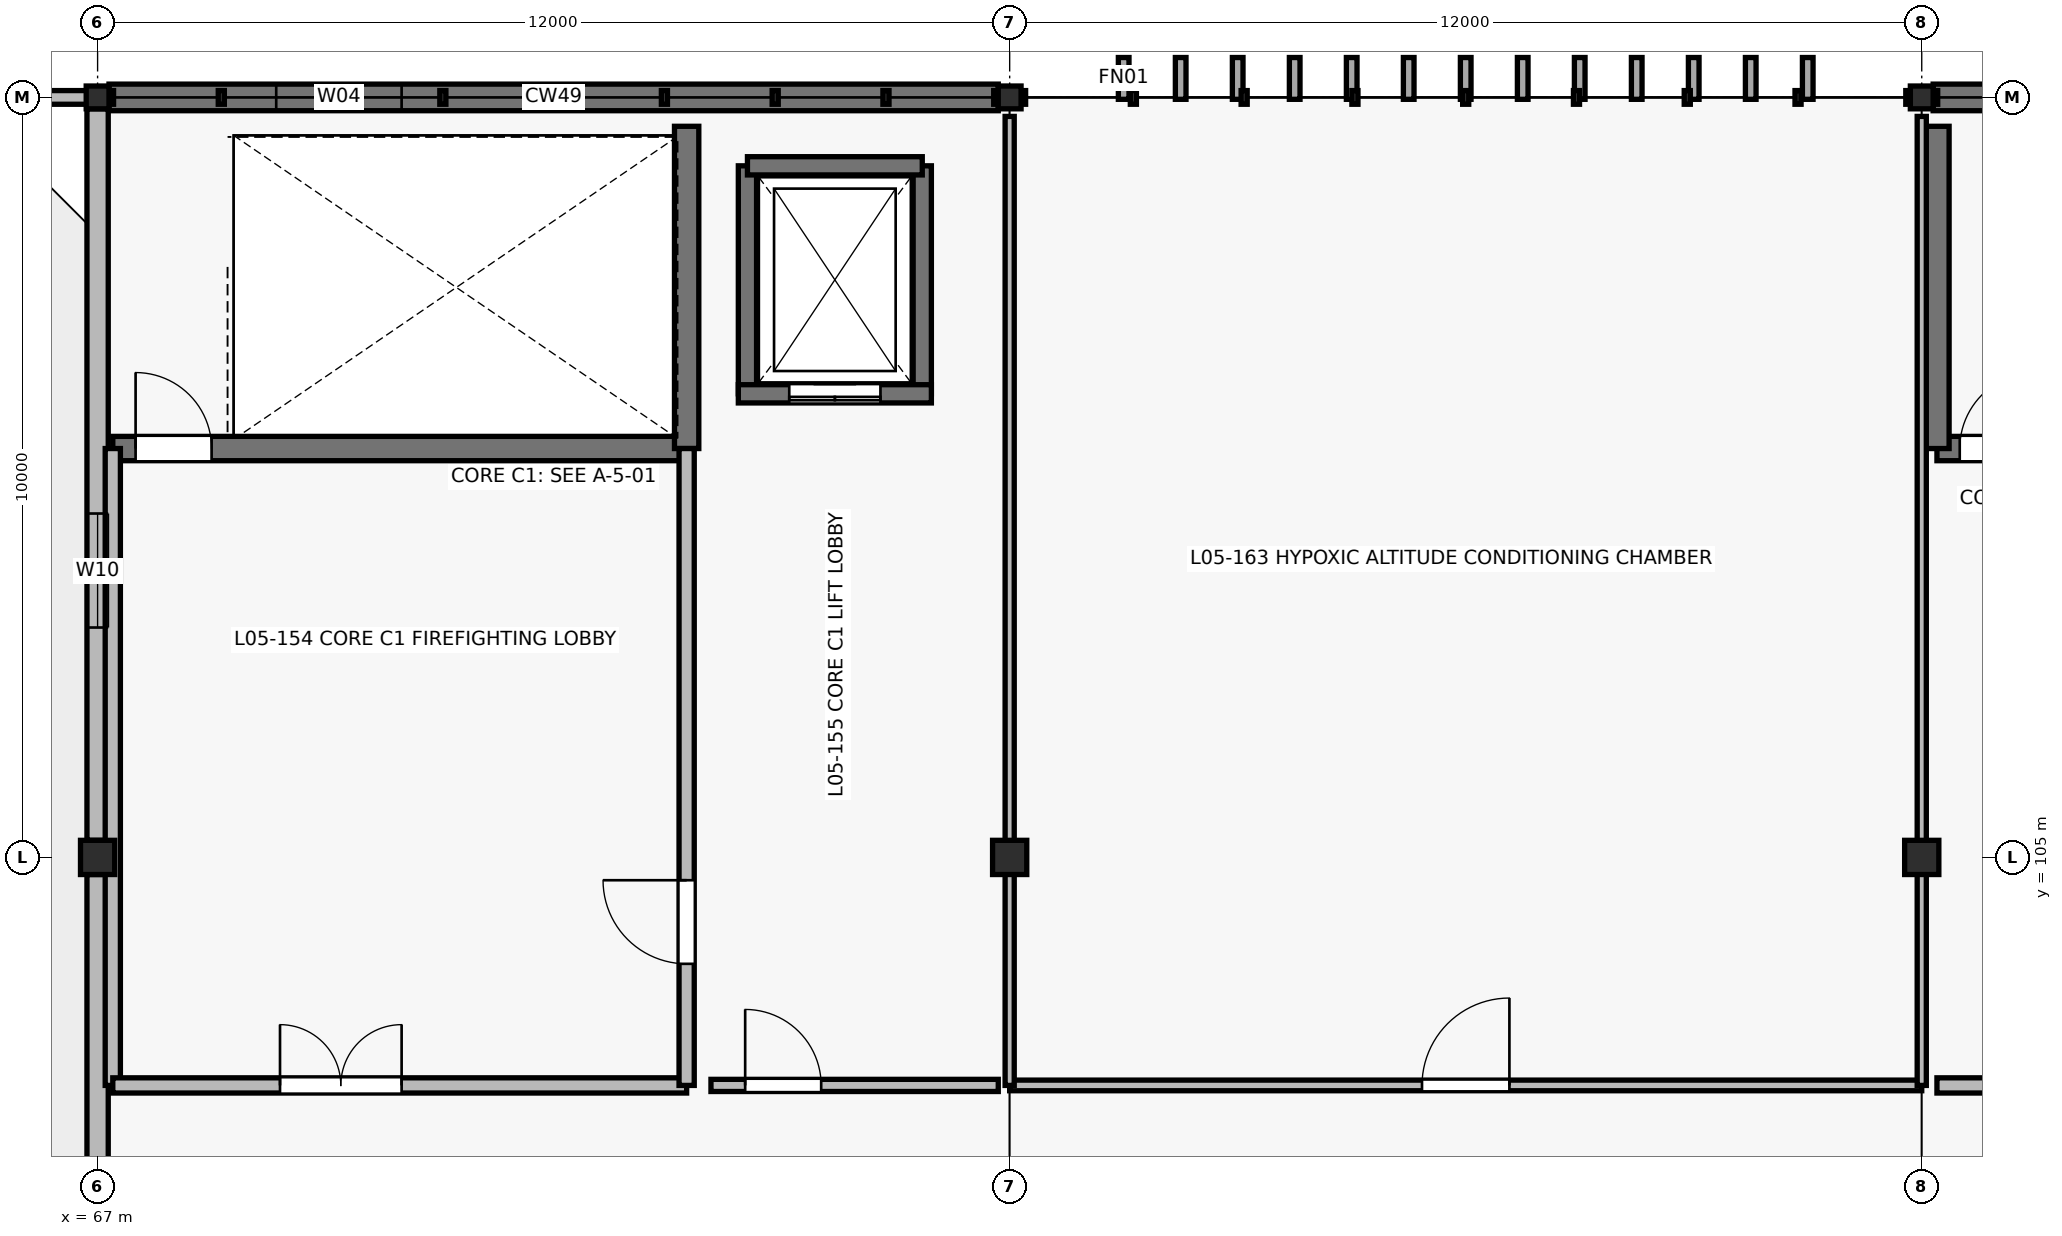
"""IFC4 building model, lengths in metres.
Left out: names, types, materials, properties, quantities, classifications, styles, units other than length and angle.
Written with IfcOpenShell. Run it as: python <this file> out.ifc"""

import sys

from ifc_helpers import new_model, si_unit, direction, frame, frame_2d, origin, origin_2d, place, context, subcontext, project, spatial, rectangle, i_section, extrude, element, fill, save


model = new_model("IFC4")
c1 = context("Model", 3, precision=1e-05, world=origin(), true_north=direction((0.0, 1.0)))
c2 = subcontext(c1, "Body", "Model", "MODEL_VIEW")
j1 = project(units=[si_unit("LENGTHUNIT", "METRE"), si_unit("PLANEANGLEUNIT", "RADIAN")], contexts=[c1])
p1 = place(None, origin())
s1 = spatial("IfcSite", under=j1, at=p1, CompositionType="ELEMENT")
p2 = place(p1, origin())
s2 = spatial("IfcBuilding", under=s1, at=p2, CompositionType="ELEMENT")
p3 = place(p2, frame((0.0, 0.0, 21.6)))
s3 = spatial("IfcBuildingStorey", under=s2, at=p3, CompositionType="ELEMENT", Elevation=21.6)
p4 = place(p3, frame((67.0, 105.0, 0.0), z_axis=(0.0, 0.0, 1.0), x_axis=(1.0, 0.0, 0.0)))
e1 = element("IfcColumn", 1, at=p4, inside=s3, PredefinedType="COLUMN", context=c2, shape_type="SweptSolid", body=[
    extrude(rectangle(XDim=0.45, YDim=0.45, at=origin_2d()), origin(), (0.0, 0.0, 1.0), 4.2),
])
p5 = place(p3, frame((67.0, 115.0, 0.0), z_axis=(0.0, 0.0, 1.0), x_axis=(1.0, 0.0, 0.0)))
e2 = element("IfcColumn", 2, at=p5, inside=s3, PredefinedType="COLUMN", context=c2, shape_type="SweptSolid", body=[
    extrude(i_section(OverallWidth=0.3, OverallDepth=0.3, WebThickness=0.011, FlangeThickness=0.019, at=origin_2d()), origin(), (0.0, 0.0, 1.0), 4.2),
])
p6 = place(p3, frame((79.0, 105.0, 0.0), z_axis=(0.0, 0.0, 1.0), x_axis=(1.0, 0.0, 0.0)))
e3 = element("IfcColumn", 3, at=p6, inside=s3, PredefinedType="COLUMN", context=c2, shape_type="SweptSolid", body=[
    extrude(rectangle(XDim=0.45, YDim=0.45, at=origin_2d()), origin(), (0.0, 0.0, 1.0), 4.2),
])
p7 = place(p3, frame((79.0, 115.0, 0.0), z_axis=(0.0, 0.0, 1.0), x_axis=(1.0, 0.0, 0.0)))
e4 = element("IfcColumn", 4, at=p7, inside=s3, PredefinedType="COLUMN", context=c2, shape_type="SweptSolid", body=[
    extrude(i_section(OverallWidth=0.3, OverallDepth=0.3, WebThickness=0.011, FlangeThickness=0.019, at=origin_2d()), origin(), (0.0, 0.0, 1.0), 4.2),
])
p8 = place(p3, frame((91.0, 105.0, 0.0), z_axis=(0.0, 0.0, 1.0), x_axis=(1.0, 0.0, 0.0)))
e5 = element("IfcColumn", 5, at=p8, inside=s3, PredefinedType="COLUMN", context=c2, shape_type="SweptSolid", body=[
    extrude(rectangle(XDim=0.45, YDim=0.45, at=origin_2d()), origin(), (0.0, 0.0, 1.0), 4.2),
])
p9 = place(p3, frame((91.0, 115.0, 0.0), z_axis=(0.0, 0.0, 1.0), x_axis=(1.0, 0.0, 0.0)))
e6 = element("IfcColumn", 6, at=p9, inside=s3, PredefinedType="COLUMN", context=c2, shape_type="SweptSolid", body=[
    extrude(i_section(OverallWidth=0.3, OverallDepth=0.3, WebThickness=0.011, FlangeThickness=0.019, at=origin_2d()), origin(), (0.0, 0.0, 1.0), 4.2),
])
p10 = place(p3, frame((67.15, 115.0, 0.0), z_axis=(0.0, 0.0, 1.0), x_axis=(1.0, 0.0, 0.0)))
e7 = element("IfcWall", 7, at=p10, inside=s3, PredefinedType="SOLIDWALL", context=c2, shape_type="SweptSolid", body=[
    extrude(rectangle(XDim=11.7, YDim=0.35, at=frame_2d((5.85, 0.0))), origin(), (0.0, 0.0, 1.0), 4.2),
])
p11 = place(p10, frame((2.2, 0.0, 1.0)))
e8 = element("IfcOpeningElement", 8, at=p11, cuts=e7, PredefinedType="OPENING", context=c2, shape_type="SweptSolid", body=[
    extrude(rectangle(XDim=1.65, YDim=1.5, at=frame_2d((0.825, 0.75))), frame((0.0, 0.185, 0.0), z_axis=(0.0, -1.0, 0.0), x_axis=(1.0, 0.0, 0.0)), (0.0, 0.0, 1.0), 0.37),
])
p12 = place(p3, frame((91.15, 115.0, 0.0), z_axis=(0.0, 0.0, 1.0), x_axis=(1.0, 0.0, 0.0)))
e9 = element("IfcWall", 9, at=p12, inside=s3, PredefinedType="SOLIDWALL", context=c2, shape_type="SweptSolid", body=[
    extrude(rectangle(XDim=9.7, YDim=0.35, at=frame_2d((4.85, 0.0))), origin(), (0.0, 0.0, 1.0), 4.2),
])
p13 = place(p12, frame((2.2, 0.0, 1.0)))
e10 = element("IfcOpeningElement", 10, at=p13, cuts=e9, PredefinedType="OPENING", context=c2, shape_type="SweptSolid", body=[
    extrude(rectangle(XDim=2.1, YDim=1.5, at=frame_2d((1.05, 0.75))), frame((0.0, 0.185, 0.0), z_axis=(0.0, -1.0, 0.0), x_axis=(1.0, 0.0, 0.0)), (0.0, 0.0, 1.0), 0.37),
])
p14 = place(p3, frame((67.0, 95.225, 0.0), z_axis=(0.0, 0.0, 1.0), x_axis=(0.0, 1.0, 0.0)))
e11 = element("IfcWall", 11, at=p14, inside=s3, PredefinedType="SOLIDWALL", context=c2, shape_type="SweptSolid", body=[
    extrude(rectangle(XDim=9.55, YDim=0.28, at=frame_2d((4.775, 0.0))), origin(), (0.0, 0.0, 1.0), 3.25),
])
p15 = place(p14, frame((2.8, 0.0, 0.9)))
e12 = element("IfcOpeningElement", 12, at=p15, cuts=e11, PredefinedType="OPENING", context=c2, shape_type="SweptSolid", body=[
    extrude(rectangle(XDim=1.2, YDim=1.8, at=frame_2d((0.6, 0.9))), frame((0.0, 0.15, 0.0), z_axis=(0.0, -1.0, 0.0), x_axis=(1.0, 0.0, 0.0)), (0.0, 0.0, 1.0), 0.3),
])
p16 = place(p3, frame((67.0, 105.225, 0.0), z_axis=(0.0, 0.0, 1.0), x_axis=(0.0, 1.0, 0.0)))
e13 = element("IfcWall", 13, at=p16, inside=s3, PredefinedType="SOLIDWALL", context=c2, shape_type="SweptSolid", body=[
    extrude(rectangle(XDim=9.625, YDim=0.28, at=frame_2d((4.812, 0.0))), origin(), (0.0, 0.0, 1.0), 3.25),
])
p17 = place(p16, frame((2.8, 0.0, 0.9)))
e14 = element("IfcOpeningElement", 14, at=p17, cuts=e13, PredefinedType="OPENING", context=c2, shape_type="SweptSolid", body=[
    extrude(rectangle(XDim=1.5, YDim=1.8, at=frame_2d((0.75, 0.9))), frame((0.0, 0.15, 0.0), z_axis=(0.0, -1.0, 0.0), x_axis=(1.0, 0.0, 0.0)), (0.0, 0.0, 1.0), 0.3),
])
p18 = place(p3, frame((55.0, 115.0, 0.0), z_axis=(0.0, 0.0, 1.0), x_axis=(1.0, 0.0, 0.0)))
e15 = element("IfcWall", 15, at=p18, inside=s3, PredefinedType="PARAPET", context=c2, shape_type="SweptSolid", body=[
    extrude(rectangle(XDim=12.0, YDim=0.18, at=frame_2d((6.0, 0.0))), origin(), (0.0, 0.0, 1.0), 0.65),
])
for number, where, z_axis, x_axis in (
    (16, (75.55, 111.1, 0.0), (0.0, 0.0, 1.0), (0.0, 1.0, 0.0)),
    (17, (77.85, 114.1, 0.0), (0.0, 0.0, 1.0), (0.0, -1.0, 0.0)),
):
    element("IfcWall", number, at=place(p3, frame(where, z_axis=z_axis, x_axis=x_axis)), inside=s3, PredefinedType="SHEAR", context=c2, shape_type="SweptSolid", body=[
        extrude(rectangle(XDim=3.0, YDim=0.24, at=frame_2d((1.5, 0.0))), origin(), (0.0, 0.0, 1.0), 3.95),
    ])
p19 = place(p3, frame((75.55, 114.1, 0.0), z_axis=(0.0, 0.0, 1.0), x_axis=(1.0, 0.0, 0.0)))
e18 = element("IfcWall", 18, at=p19, inside=s3, PredefinedType="SHEAR", context=c2, shape_type="SweptSolid", body=[
    extrude(rectangle(XDim=2.3, YDim=0.24, at=frame_2d((1.15, 0.0))), origin(), (0.0, 0.0, 1.0), 3.95),
])
p20 = place(p3, frame((77.97, 111.1, 0.0), z_axis=(0.0, 0.0, 1.0), x_axis=(-1.0, 0.0, 0.0)))
e19 = element("IfcWall", 19, at=p20, inside=s3, PredefinedType="SHEAR", context=c2, shape_type="SweptSolid", body=[
    extrude(rectangle(XDim=2.54, YDim=0.24, at=frame_2d((1.27, 0.0))), origin(), (0.0, 0.0, 1.0), 3.95),
])
p21 = place(p20, frame((0.67, 0.0, 0.0)))
e20 = element("IfcOpeningElement", 20, at=p21, cuts=e19, PredefinedType="OPENING", context=c2, shape_type="SweptSolid", body=[
    extrude(rectangle(XDim=1.2, YDim=2.15, at=frame_2d((0.6, 1.075))), frame((0.0, 0.13, 0.0), z_axis=(0.0, -1.0, 0.0), x_axis=(1.0, 0.0, 0.0)), (0.0, 0.0, 1.0), 0.26),
])
p22 = place(p3, frame((67.2, 110.38, 0.0), z_axis=(0.0, 0.0, 1.0), x_axis=(1.0, 0.0, 0.0)))
e21 = element("IfcWall", 21, at=p22, inside=s3, PredefinedType="SHEAR", context=c2, shape_type="SweptSolid", body=[
    extrude(rectangle(XDim=7.55, YDim=0.32, at=frame_2d((3.775, 0.0))), origin(), (0.0, 0.0, 1.0), 3.95),
])
p23 = place(p22, frame((0.3, 0.0, 0.0)))
e22 = element("IfcOpeningElement", 22, at=p23, cuts=e21, PredefinedType="OPENING", context=c2, shape_type="SweptSolid", body=[
    extrude(rectangle(XDim=1.0, YDim=2.15, at=frame_2d((0.5, 1.075))), frame((0.0, 0.17, 0.0), z_axis=(0.0, -1.0, 0.0), x_axis=(1.0, 0.0, 0.0)), (0.0, 0.0, 1.0), 0.34),
])
p24 = place(p3, frame((74.75, 110.38, 0.0), z_axis=(0.0, 0.0, 1.0), x_axis=(0.0, 1.0, 0.0)))
e23 = element("IfcWall", 23, at=p24, inside=s3, PredefinedType="SHEAR", context=c2, shape_type="SweptSolid", body=[
    extrude(rectangle(XDim=4.24, YDim=0.32, at=frame_2d((2.12, 0.0))), origin(), (0.0, 0.0, 1.0), 3.95),
])
p25 = place(p3, frame((67.2, 102.0, 0.0), z_axis=(0.0, 0.0, 1.0), x_axis=(0.0, 1.0, 0.0)))
e24 = element("IfcWall", 24, at=p25, inside=s3, PredefinedType="PARTITIONING", context=c2, shape_type="SweptSolid", body=[
    extrude(rectangle(XDim=8.38, YDim=0.2, at=frame_2d((4.19, 0.0))), origin(), (0.0, 0.0, 1.0), 3.25),
])
p26 = place(p3, frame((67.2, 102.0, 0.0), z_axis=(0.0, 0.0, 1.0), x_axis=(1.0, 0.0, 0.0)))
e25 = element("IfcWall", 25, at=p26, inside=s3, PredefinedType="PARTITIONING", context=c2, shape_type="SweptSolid", body=[
    extrude(rectangle(XDim=7.55, YDim=0.2, at=frame_2d((3.775, 0.0))), origin(), (0.0, 0.0, 1.0), 3.25),
])
p27 = place(p26, frame((2.2, 0.0, 0.0)))
e26 = element("IfcOpeningElement", 26, at=p27, cuts=e25, PredefinedType="OPENING", context=c2, shape_type="SweptSolid", body=[
    extrude(rectangle(XDim=1.6, YDim=2.2, at=frame_2d((0.8, 1.1))), frame((0.0, 0.11, 0.0), z_axis=(0.0, -1.0, 0.0), x_axis=(1.0, 0.0, 0.0)), (0.0, 0.0, 1.0), 0.22),
])
p28 = place(p3, frame((74.75, 102.0, 0.0), z_axis=(0.0, 0.0, 1.0), x_axis=(0.0, 1.0, 0.0)))
e27 = element("IfcWall", 27, at=p28, inside=s3, PredefinedType="PARTITIONING", context=c2, shape_type="SweptSolid", body=[
    extrude(rectangle(XDim=8.38, YDim=0.2, at=frame_2d((4.19, 0.0))), origin(), (0.0, 0.0, 1.0), 3.3),
])
p29 = place(p28, frame((1.6, 0.0, 0.0)))
e28 = element("IfcOpeningElement", 28, at=p29, cuts=e27, PredefinedType="OPENING", context=c2, shape_type="SweptSolid", body=[
    extrude(rectangle(XDim=1.1, YDim=2.15, at=frame_2d((0.55, 1.075))), frame((0.0, 0.11, 0.0), z_axis=(0.0, -1.0, 0.0), x_axis=(1.0, 0.0, 0.0)), (0.0, 0.0, 1.0), 0.22),
])
p30 = place(p3, frame((75.07, 102.0, 0.0), z_axis=(0.0, 0.0, 1.0), x_axis=(1.0, 0.0, 0.0)))
e29 = element("IfcWall", 29, at=p30, inside=s3, PredefinedType="PARTITIONING", context=c2, shape_type="SweptSolid", body=[
    extrude(rectangle(XDim=3.78, YDim=0.16, at=frame_2d((1.89, 0.0))), origin(), (0.0, 0.0, 1.0), 3.25),
])
p31 = place(p30, frame((0.45, 0.0, 0.0)))
e30 = element("IfcOpeningElement", 30, at=p31, cuts=e29, PredefinedType="OPENING", context=c2, shape_type="SweptSolid", body=[
    extrude(rectangle(XDim=1.0, YDim=2.15, at=frame_2d((0.5, 1.075))), frame((0.0, 0.09, 0.0), z_axis=(0.0, -1.0, 0.0), x_axis=(1.0, 0.0, 0.0)), (0.0, 0.0, 1.0), 0.18),
])
p32 = place(p3, frame((91.2, 110.38, 0.0), z_axis=(0.0, 0.0, 1.0), x_axis=(1.0, 0.0, 0.0)))
e31 = element("IfcWall", 31, at=p32, inside=s3, PredefinedType="SHEAR", context=c2, shape_type="SweptSolid", body=[
    extrude(rectangle(XDim=7.1, YDim=0.32, at=frame_2d((3.55, 0.0))), origin(), (0.0, 0.0, 1.0), 3.95),
])
p33 = place(p32, frame((0.3, 0.0, 0.0)))
e32 = element("IfcOpeningElement", 32, at=p33, cuts=e31, PredefinedType="OPENING", context=c2, shape_type="SweptSolid", body=[
    extrude(rectangle(XDim=1.0, YDim=2.15, at=frame_2d((0.5, 1.075))), frame((0.0, 0.17, 0.0), z_axis=(0.0, -1.0, 0.0), x_axis=(1.0, 0.0, 0.0)), (0.0, 0.0, 1.0), 0.34),
])
p34 = place(p3, frame((91.2, 114.62, 0.0), z_axis=(0.0, 0.0, 1.0), x_axis=(0.0, -1.0, 0.0)))
e33 = element("IfcWall", 33, at=p34, inside=s3, PredefinedType="SHEAR", context=c2, shape_type="SweptSolid", body=[
    extrude(rectangle(XDim=4.24, YDim=0.32, at=frame_2d((2.12, 0.0))), origin(), (0.0, 0.0, 1.0), 3.95),
])
p35 = place(p3, frame((91.2, 102.0, 0.0), z_axis=(0.0, 0.0, 1.0), x_axis=(1.0, 0.0, 0.0)))
e34 = element("IfcWall", 34, at=p35, inside=s3, PredefinedType="PARTITIONING", context=c2, shape_type="SweptSolid", body=[
    extrude(rectangle(XDim=7.1, YDim=0.2, at=frame_2d((3.55, 0.0))), origin(), (0.0, 0.0, 1.0), 3.25),
])
p36 = place(p35, frame((2.2, 0.0, 0.0)))
e35 = element("IfcOpeningElement", 35, at=p36, cuts=e34, PredefinedType="OPENING", context=c2, shape_type="SweptSolid", body=[
    extrude(rectangle(XDim=1.6, YDim=2.2, at=frame_2d((0.8, 1.1))), frame((0.0, 0.11, 0.0), z_axis=(0.0, -1.0, 0.0), x_axis=(1.0, 0.0, 0.0)), (0.0, 0.0, 1.0), 0.22),
])
p37 = place(p3, frame((79.0, 102.0, 0.0), z_axis=(0.0, 0.0, 1.0), x_axis=(1.0, 0.0, 0.0)))
e36 = element("IfcWall", 36, at=p37, inside=s3, PredefinedType="PARTITIONING", context=c2, shape_type="SweptSolid", body=[
    extrude(rectangle(XDim=12.0, YDim=0.14, at=frame_2d((6.0, 0.0))), origin(), (0.0, 0.0, 1.0), 3.25),
])
p38 = place(p37, frame((5.425, 0.0, 0.0)))
e37 = element("IfcOpeningElement", 37, at=p38, cuts=e36, PredefinedType="OPENING", context=c2, shape_type="SweptSolid", body=[
    extrude(rectangle(XDim=1.15, YDim=2.15, at=frame_2d((0.575, 1.075))), frame((0.0, 0.08, 0.0), z_axis=(0.0, -1.0, 0.0), x_axis=(1.0, 0.0, 0.0)), (0.0, 0.0, 1.0), 0.16),
])
for number, where, z_axis, x_axis in (
    (38, (79.0, 102.0, 0.0), (0.0, 0.0, 1.0), (0.0, 1.0, 0.0)),
    (39, (91.0, 102.0, 0.0), (0.0, 0.0, 1.0), (0.0, 1.0, 0.0)),
):
    element("IfcWall", number, at=place(p3, frame(where, z_axis=z_axis, x_axis=x_axis)), inside=s3, PredefinedType="PARTITIONING", context=c2, shape_type="SweptSolid", body=[
        extrude(rectangle(XDim=12.75, YDim=0.12, at=frame_2d((6.375, 0.0))), origin(), (0.0, 0.0, 1.0), 3.25),
    ])
p39 = place(p11, origin())
e40 = element("IfcWindow", 40, at=p39, inside=s3, PartitioningType="SINGLE_PANEL", PredefinedType="WINDOW", context=c2, shape_type="SweptSolid", body=[
    extrude(rectangle(XDim=1.65, YDim=1.5, at=frame_2d((0.825, 0.75))), frame((0.0, 0.03, 0.0), z_axis=(0.0, -1.0, 0.0), x_axis=(1.0, 0.0, 0.0)), (0.0, 0.0, 1.0), 0.06),
])
fill(e8, e40)
p40 = place(p17, origin())
e41 = element("IfcWindow", 41, at=p40, inside=s3, PartitioningType="SINGLE_PANEL", PredefinedType="WINDOW", context=c2, shape_type="SweptSolid", body=[
    extrude(rectangle(XDim=1.5, YDim=1.8, at=frame_2d((0.75, 0.9))), frame((0.0, 0.03, 0.0), z_axis=(0.0, -1.0, 0.0), x_axis=(1.0, 0.0, 0.0)), (0.0, 0.0, 1.0), 0.06),
])
fill(e14, e41)
p41 = place(p21, origin())
e42 = element("IfcDoor", 42, at=p41, inside=s3, OperationType="DOUBLE_DOOR_SLIDING", PredefinedType="USERDEFINED", context=c2, shape_type="SweptSolid", body=[
    extrude(rectangle(XDim=1.2, YDim=2.15, at=frame_2d((0.6, 1.075))), frame((0.0, 0.025, 0.0), z_axis=(0.0, -1.0, 0.0), x_axis=(1.0, 0.0, 0.0)), (0.0, 0.0, 1.0), 0.05),
])
fill(e20, e42)
p42 = place(p23, origin())
e43 = element("IfcDoor", 43, at=p42, inside=s3, OperationType="SINGLE_SWING_LEFT", PredefinedType="DOOR", context=c2, shape_type="SweptSolid", body=[
    extrude(rectangle(XDim=1.0, YDim=2.15, at=frame_2d((0.5, 1.075))), frame((0.0, 0.025, 0.0), z_axis=(0.0, -1.0, 0.0), x_axis=(1.0, 0.0, 0.0)), (0.0, 0.0, 1.0), 0.05),
])
fill(e22, e43)
p43 = place(p27, origin())
e44 = element("IfcDoor", 44, at=p43, inside=s3, OperationType="DOUBLE_DOOR_SINGLE_SWING", PredefinedType="DOOR", context=c2, shape_type="SweptSolid", body=[
    extrude(rectangle(XDim=1.6, YDim=2.2, at=frame_2d((0.8, 1.1))), frame((0.0, 0.025, 0.0), z_axis=(0.0, -1.0, 0.0), x_axis=(1.0, 0.0, 0.0)), (0.0, 0.0, 1.0), 0.05),
])
fill(e26, e44)
p44 = place(p29, origin())
e45 = element("IfcDoor", 45, at=p44, inside=s3, OperationType="SINGLE_SWING_RIGHT", PredefinedType="DOOR", context=c2, shape_type="SweptSolid", body=[
    extrude(rectangle(XDim=1.1, YDim=2.15, at=frame_2d((0.55, 1.075))), frame((0.0, 0.025, 0.0), z_axis=(0.0, -1.0, 0.0), x_axis=(1.0, 0.0, 0.0)), (0.0, 0.0, 1.0), 0.05),
])
fill(e28, e45)
p45 = place(p31, origin())
e46 = element("IfcDoor", 46, at=p45, inside=s3, OperationType="SINGLE_SWING_LEFT", PredefinedType="DOOR", context=c2, shape_type="SweptSolid", body=[
    extrude(rectangle(XDim=1.0, YDim=2.15, at=frame_2d((0.5, 1.075))), frame((0.0, 0.025, 0.0), z_axis=(0.0, -1.0, 0.0), x_axis=(1.0, 0.0, 0.0)), (0.0, 0.0, 1.0), 0.05),
])
fill(e30, e46)
p46 = place(p33, origin())
e47 = element("IfcDoor", 47, at=p46, inside=s3, OperationType="SINGLE_SWING_RIGHT", PredefinedType="DOOR", context=c2, shape_type="SweptSolid", body=[
    extrude(rectangle(XDim=1.0, YDim=2.15, at=frame_2d((0.5, 1.075))), frame((0.0, 0.025, 0.0), z_axis=(0.0, -1.0, 0.0), x_axis=(1.0, 0.0, 0.0)), (0.0, 0.0, 1.0), 0.05),
])
fill(e32, e47)
p47 = place(p38, origin())
e48 = element("IfcDoor", 48, at=p47, inside=s3, OperationType="SINGLE_SWING_RIGHT", PredefinedType="DOOR", context=c2, shape_type="SweptSolid", body=[
    extrude(rectangle(XDim=1.15, YDim=2.15, at=frame_2d((0.575, 1.075))), frame((0.0, 0.025, 0.0), z_axis=(0.0, -1.0, 0.0), x_axis=(1.0, 0.0, 0.0)), (0.0, 0.0, 1.0), 0.05),
])
fill(e37, e48)
save(model, sys.argv[1])
